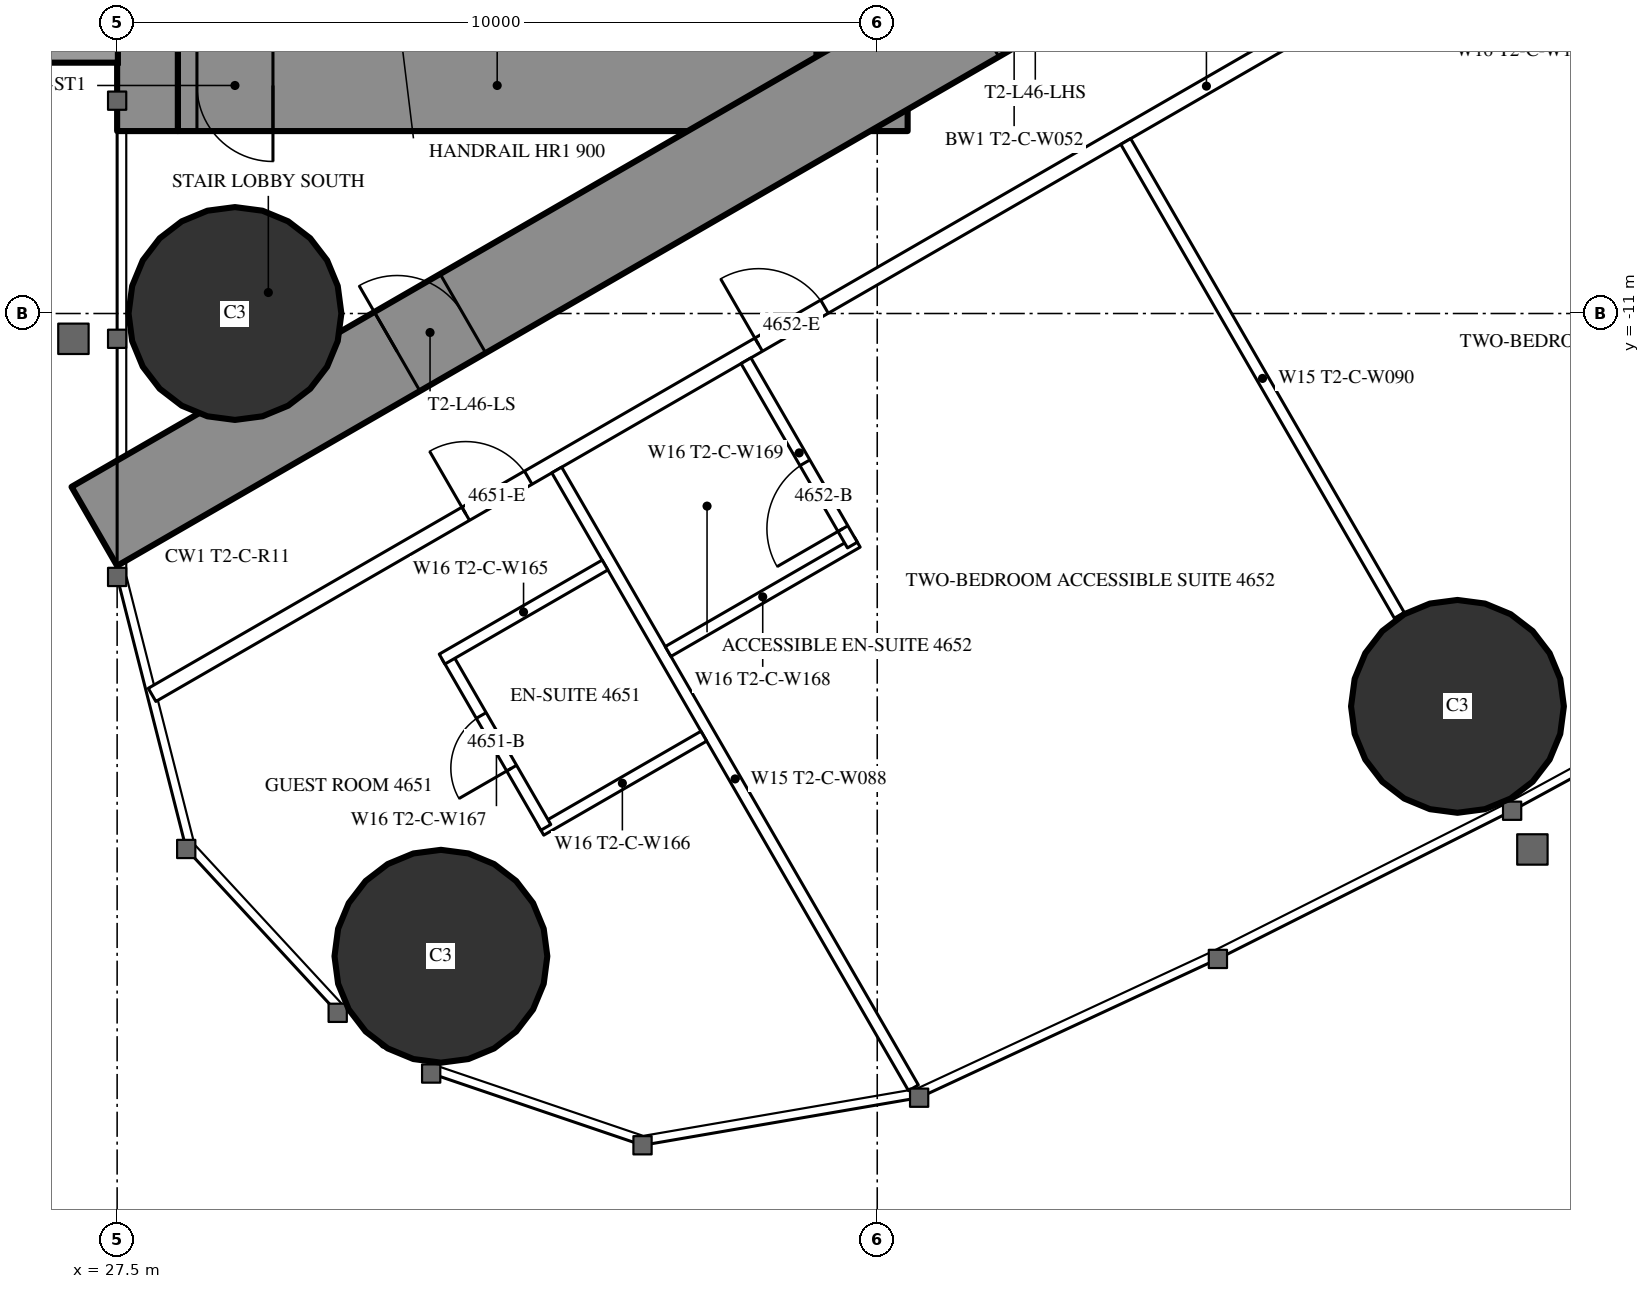
"""IFC4 building model, lengths in metres.
Left out: names, types, materials, properties, quantities, classifications, styles, units other than length and angle.
Written with IfcOpenShell. Run it as: python <this file> out.ifc"""

import sys

from ifc_helpers import new_model, si_unit, direction, frame, frame_2d, origin, origin_2d, place, context, subcontext, project, spatial, rectangle, circle, extrude, element, fill, save


model = new_model("IFC4")
c1 = context("Model", 3, precision=1e-05, world=origin(), true_north=direction((0.0, 1.0)))
c2 = subcontext(c1, "Body", "Model", "MODEL_VIEW")
j1 = project(units=[si_unit("LENGTHUNIT", "METRE"), si_unit("PLANEANGLEUNIT", "RADIAN")], contexts=[c1])
p1 = place(None, origin())
s1 = spatial("IfcSite", under=j1, at=p1, CompositionType="ELEMENT")
p2 = place(p1, origin())
s2 = spatial("IfcBuilding", under=s1, at=p2, CompositionType="ELEMENT")
p3 = place(p2, frame((0.0, 0.0, 173.8)))
s3 = spatial("IfcBuildingStorey", under=s2, at=p3, CompositionType="ELEMENT", Elevation=173.8)
for number, where, z_axis, x_axis in (
    (1, (31.76, -19.456, 0.0), (0.0, 0.0, 1.0), (1.0, 0.0, 0.0)),
    (2, (29.05, -11.0, 0.0), (0.0, 0.0, 1.0), (1.0, 0.0, 0.0)),
    (3, (45.134, -16.168, 0.0), (0.0, 0.0, 1.0), (1.0, 0.0, 0.0)),
):
    element("IfcColumn", number, at=place(p3, frame(where, z_axis=z_axis, x_axis=x_axis)), inside=s3, PredefinedType="COLUMN", context=c2, shape_type="SweptSolid", body=[
        extrude(circle(Radius=1.4, at=origin_2d()), origin(), (0.0, 0.0, 1.0), 3.5),
    ])
p4 = place(p3, frame((27.9, -8.6, 0.0), z_axis=(0.0, 0.0, 1.0), x_axis=(0.0, 1.0, 0.0)))
e4 = element("IfcWall", 4, at=p4, inside=s3, PredefinedType="SHEAR", context=c2, shape_type="SweptSolid", body=[
    extrude(rectangle(XDim=17.2, YDim=0.8, at=frame_2d((8.6, 0.0))), origin(), (0.0, 0.0, 1.0), 3.5),
])
p5 = place(p4, frame((2.45, 0.0, 0.6)))
e5 = element("IfcOpeningElement", 5, at=p5, cuts=e4, PredefinedType="OPENING", context=c2, shape_type="SweptSolid", body=[
    extrude(rectangle(XDim=0.6, YDim=2.1, at=frame_2d((0.3, 1.05))), frame((0.0, 0.41, 0.0), z_axis=(0.0, -1.0, 0.0), x_axis=(1.0, 0.0, 0.0)), (0.0, 0.0, 1.0), 0.82),
])
p6 = place(p4, frame((14.15, 0.0, 0.6)))
e6 = element("IfcOpeningElement", 6, at=p6, cuts=e4, PredefinedType="OPENING", context=c2, shape_type="SweptSolid", body=[
    extrude(rectangle(XDim=0.6, YDim=2.1, at=frame_2d((0.3, 1.05))), frame((0.0, 0.41, 0.0), z_axis=(0.0, -1.0, 0.0), x_axis=(1.0, 0.0, 0.0)), (0.0, 0.0, 1.0), 0.82),
])
p7 = place(p3, frame((37.3, -8.6, 0.0), z_axis=(0.0, 0.0, 1.0), x_axis=(0.0, 1.0, 0.0)))
e7 = element("IfcWall", 7, at=p7, inside=s3, PredefinedType="SHEAR", context=c2, shape_type="SweptSolid", body=[
    extrude(rectangle(XDim=17.2, YDim=1.2, at=frame_2d((8.6, 0.0))), origin(), (0.0, 0.0, 1.0), 3.5),
])
p8 = place(p7, frame((7.7, 0.0, 0.0)))
e8 = element("IfcOpeningElement", 8, at=p8, cuts=e7, PredefinedType="OPENING", context=c2, shape_type="SweptSolid", body=[
    extrude(rectangle(XDim=1.8, YDim=2.2, at=frame_2d((0.9, 1.1))), frame((0.0, 0.61, 0.0), z_axis=(0.0, -1.0, 0.0), x_axis=(1.0, 0.0, 0.0)), (0.0, 0.0, 1.0), 1.22),
])
p9 = place(p3, frame((28.3, -8.0, 0.0), z_axis=(0.0, 0.0, 1.0), x_axis=(1.0, 0.0, 0.0)))
e9 = element("IfcWall", 9, at=p9, inside=s3, PredefinedType="SHEAR", context=c2, shape_type="SweptSolid", body=[
    extrude(rectangle(XDim=8.4, YDim=1.2, at=frame_2d((4.2, 0.0))), origin(), (0.0, 0.0, 1.0), 3.5),
])
p10 = place(p9, frame((0.25, 0.0, 0.0)))
e10 = element("IfcOpeningElement", 10, at=p10, cuts=e9, PredefinedType="OPENING", context=c2, shape_type="SweptSolid", body=[
    extrude(rectangle(XDim=1.0, YDim=2.2, at=frame_2d((0.5, 1.1))), frame((0.0, 0.61, 0.0), z_axis=(0.0, -1.0, 0.0), x_axis=(1.0, 0.0, 0.0)), (0.0, 0.0, 1.0), 1.22),
])
p11 = place(p3, frame((27.2, -13.8, 0.0), z_axis=(0.0, 0.0, 1.0), x_axis=(0.866027159892, 0.499996958321, 0.0)))
e11 = element("IfcWall", 11, at=p11, inside=s3, PredefinedType="SHEAR", context=c2, shape_type="SweptSolid", body=[
    extrude(rectangle(XDim=27.947, YDim=1.2, at=frame_2d((13.973, 0.0))), origin(), (0.0, 0.0, 1.0), 3.5),
])
p12 = place(p11, frame((4.6, 0.0, 0.0)))
e12 = element("IfcOpeningElement", 12, at=p12, cuts=e11, PredefinedType="OPENING", context=c2, shape_type="SweptSolid", body=[
    extrude(rectangle(XDim=1.0, YDim=2.2, at=frame_2d((0.5, 1.1))), frame((0.0, 0.61, 0.0), z_axis=(0.0, -1.0, 0.0), x_axis=(1.0, 0.0, 0.0)), (0.0, 0.0, 1.0), 1.22),
])
p13 = place(p11, frame((13.395, 0.0, 0.0)))
e13 = element("IfcOpeningElement", 13, at=p13, cuts=e11, PredefinedType="OPENING", context=c2, shape_type="SweptSolid", body=[
    extrude(rectangle(XDim=1.8, YDim=2.2, at=frame_2d((0.9, 1.1))), frame((0.0, 0.61, 0.0), z_axis=(0.0, -1.0, 0.0), x_axis=(1.0, 0.0, 0.0)), (0.0, 0.0, 1.0), 1.22),
])
p14 = place(p3, frame((27.959, -16.017, 0.0), z_axis=(0.0, 0.0, 1.0), x_axis=(0.866024151371, 0.500002169237, 0.0)))
e14 = element("IfcWall", 14, at=p14, inside=s3, PredefinedType="PARTITIONING", context=c2, shape_type="SweptSolid", body=[
    extrude(rectangle(XDim=32.034, YDim=0.2, at=frame_2d((16.017, 0.0))), origin(), (0.0, 0.0, 1.0), 3.25),
])
p15 = place(p14, frame((4.765, 0.0, 0.0)))
e15 = element("IfcOpeningElement", 15, at=p15, cuts=e14, PredefinedType="OPENING", context=c2, shape_type="SweptSolid", body=[
    extrude(rectangle(XDim=0.95, YDim=2.2, at=frame_2d((0.475, 1.1))), frame((0.0, 0.11, 0.0), z_axis=(0.0, -1.0, 0.0), x_axis=(1.0, 0.0, 0.0)), (0.0, 0.0, 1.0), 0.22),
])
p16 = place(p14, frame((9.215, 0.0, 0.0)))
e16 = element("IfcOpeningElement", 16, at=p16, cuts=e14, PredefinedType="OPENING", context=c2, shape_type="SweptSolid", body=[
    extrude(rectangle(XDim=1.0, YDim=2.2, at=frame_2d((0.5, 1.1))), frame((0.0, 0.11, 0.0), z_axis=(0.0, -1.0, 0.0), x_axis=(1.0, 0.0, 0.0)), (0.0, 0.0, 1.0), 0.22),
])
p17 = place(p14, frame((19.725, 0.0, 0.0)))
e17 = element("IfcOpeningElement", 17, at=p17, cuts=e14, PredefinedType="OPENING", context=c2, shape_type="SweptSolid", body=[
    extrude(rectangle(XDim=0.95, YDim=2.2, at=frame_2d((0.475, 1.1))), frame((0.0, 0.11, 0.0), z_axis=(0.0, -1.0, 0.0), x_axis=(1.0, 0.0, 0.0)), (0.0, 0.0, 1.0), 0.22),
])
p18 = place(p14, frame((26.125, 0.0, 0.0)))
e18 = element("IfcOpeningElement", 18, at=p18, cuts=e14, PredefinedType="OPENING", context=c2, shape_type="SweptSolid", body=[
    extrude(rectangle(XDim=0.95, YDim=2.2, at=frame_2d((0.475, 1.1))), frame((0.0, 0.11, 0.0), z_axis=(0.0, -1.0, 0.0), x_axis=(1.0, 0.0, 0.0)), (0.0, 0.0, 1.0), 0.22),
])
p19 = place(p14, frame((28.106, 0.0, 0.0)))
e19 = element("IfcOpeningElement", 19, at=p19, cuts=e14, PredefinedType="OPENING", context=c2, shape_type="SweptSolid", body=[
    extrude(rectangle(XDim=0.95, YDim=2.2, at=frame_2d((0.475, 1.1))), frame((0.0, 0.11, 0.0), z_axis=(0.0, -1.0, 0.0), x_axis=(1.0, 0.0, 0.0)), (0.0, 0.0, 1.0), 0.22),
])
p20 = place(p3, frame((33.284, -13.059, 0.0), z_axis=(0.0, 0.0, 1.0), x_axis=(0.499985904184, -0.866033541855, 0.0)))
e20 = element("IfcWall", 20, at=p20, inside=s3, PredefinedType="PARTITIONING", context=c2, shape_type="SweptSolid", body=[
    extrude(rectangle(XDim=9.385, YDim=0.15, at=frame_2d((4.693, 0.0))), origin(), (0.0, 0.0, 1.0), 3.25),
])
p21 = place(p3, frame((40.769, -8.737, 0.0), z_axis=(0.0, 0.0, 1.0), x_axis=(0.500013115284, -0.866017831539, 0.0)))
e21 = element("IfcWall", 21, at=p21, inside=s3, PredefinedType="PARTITIONING", context=c2, shape_type="SweptSolid", body=[
    extrude(rectangle(XDim=7.198, YDim=0.15, at=frame_2d((3.599, 0.0))), origin(), (0.0, 0.0, 1.0), 2.3),
])
p22 = place(p3, frame((33.075, -17.798, 0.0), z_axis=(0.0, 0.0, 1.0), x_axis=(0.866006523861, 0.500032699561, 0.0)))
e22 = element("IfcWall", 22, at=p22, inside=s3, PredefinedType="PARTITIONING", context=c2, shape_type="SweptSolid", body=[
    extrude(rectangle(XDim=2.475, YDim=0.15, at=frame_2d((1.237, 0.0))), origin(), (0.0, 0.0, 1.0), 3.25),
])
p23 = place(p3, frame((31.84, -15.509, 0.0), z_axis=(0.0, 0.0, 1.0), x_axis=(0.500006934395, -0.866021400173, 0.0)))
e23 = element("IfcWall", 23, at=p23, inside=s3, PredefinedType="PARTITIONING", context=c2, shape_type="SweptSolid", body=[
    extrude(rectangle(XDim=2.6, YDim=0.15, at=frame_2d((1.3, 0.0))), origin(), (0.0, 0.0, 1.0), 3.25),
])
p24 = place(p23, frame((0.9, 0.0, 0.0)))
e24 = element("IfcOpeningElement", 24, at=p24, cuts=e23, PredefinedType="OPENING", context=c2, shape_type="SweptSolid", body=[
    extrude(rectangle(XDim=0.8, YDim=2.2, at=frame_2d((0.4, 1.1))), frame((0.0, 0.085, 0.0), z_axis=(0.0, -1.0, 0.0), x_axis=(1.0, 0.0, 0.0)), (0.0, 0.0, 1.0), 0.17),
])
p25 = place(p3, frame((31.775, -15.546, 0.0), z_axis=(0.0, 0.0, 1.0), x_axis=(0.866031185235, 0.4999899861, 0.0)))
e25 = element("IfcWall", 25, at=p25, inside=s3, PredefinedType="PARTITIONING", context=c2, shape_type="SweptSolid", body=[
    extrude(rectangle(XDim=2.475, YDim=0.15, at=frame_2d((1.238, 0.0))), origin(), (0.0, 0.0, 1.0), 3.25),
])
p26 = place(p3, frame((34.749, -15.446, 0.0), z_axis=(0.0, 0.0, 1.0), x_axis=(0.866018712932, 0.500011588718, 0.0)))
e26 = element("IfcWall", 26, at=p26, inside=s3, PredefinedType="PARTITIONING", context=c2, shape_type="SweptSolid", body=[
    extrude(rectangle(XDim=2.875, YDim=0.15, at=frame_2d((1.438, 0.0))), origin(), (0.0, 0.0, 1.0), 3.25),
])
p27 = place(p3, frame((35.773, -11.621, 0.0), z_axis=(0.0, 0.0, 1.0), x_axis=(0.49998411664, -0.866034573852, 0.0)))
e27 = element("IfcWall", 27, at=p27, inside=s3, PredefinedType="PARTITIONING", context=c2, shape_type="SweptSolid", body=[
    extrude(rectangle(XDim=2.8, YDim=0.15, at=frame_2d((1.4, 0.0))), origin(), (0.0, 0.0, 1.0), 3.25),
])
p28 = place(p27, frame((1.55, 0.0, 0.0)))
e28 = element("IfcOpeningElement", 28, at=p28, cuts=e27, PredefinedType="OPENING", context=c2, shape_type="SweptSolid", body=[
    extrude(rectangle(XDim=1.0, YDim=2.2, at=frame_2d((0.5, 1.1))), frame((0.0, 0.085, 0.0), z_axis=(0.0, -1.0, 0.0), x_axis=(1.0, 0.0, 0.0)), (0.0, 0.0, 1.0), 0.17),
])
p29 = place(p3, frame((46.131, -5.641, 0.0), z_axis=(0.0, 0.0, 1.0), x_axis=(0.49997716683, -0.86603858612, 0.0)))
e29 = element("IfcWall", 29, at=p29, inside=s3, PredefinedType="PARTITIONING", context=c2, shape_type="SweptSolid", body=[
    extrude(rectangle(XDim=2.6, YDim=0.15, at=frame_2d((1.3, 0.0))), origin(), (0.0, 0.0, 1.0), 3.25),
])
p30 = place(p29, frame((0.9, 0.0, 0.0)))
e30 = element("IfcOpeningElement", 30, at=p30, cuts=e29, PredefinedType="OPENING", context=c2, shape_type="SweptSolid", body=[
    extrude(rectangle(XDim=0.8, YDim=2.2, at=frame_2d((0.4, 1.1))), frame((0.0, 0.085, 0.0), z_axis=(0.0, -1.0, 0.0), x_axis=(1.0, 0.0, 0.0)), (0.0, 0.0, 1.0), 0.17),
])
p31 = place(p24, origin())
e31 = element("IfcDoor", 31, at=p31, inside=s3, OperationType="SINGLE_SWING_RIGHT", PredefinedType="DOOR", context=c2, shape_type="SweptSolid", body=[
    extrude(rectangle(XDim=0.8, YDim=2.2, at=frame_2d((0.4, 1.1))), frame((0.0, 0.025, 0.0), z_axis=(0.0, -1.0, 0.0), x_axis=(1.0, 0.0, 0.0)), (0.0, 0.0, 1.0), 0.05),
])
fill(e24, e31)
p32 = place(p15, origin())
e32 = element("IfcDoor", 32, at=p32, inside=s3, OperationType="SINGLE_SWING_LEFT", PredefinedType="DOOR", context=c2, shape_type="SweptSolid", body=[
    extrude(rectangle(XDim=0.95, YDim=2.2, at=frame_2d((0.475, 1.1))), frame((0.0, 0.025, 0.0), z_axis=(0.0, -1.0, 0.0), x_axis=(1.0, 0.0, 0.0)), (0.0, 0.0, 1.0), 0.05),
])
fill(e15, e32)
p33 = place(p28, origin())
e33 = element("IfcDoor", 33, at=p33, inside=s3, OperationType="SINGLE_SWING_RIGHT", PredefinedType="DOOR", context=c2, shape_type="SweptSolid", body=[
    extrude(rectangle(XDim=1.0, YDim=2.2, at=frame_2d((0.5, 1.1))), frame((0.0, 0.025, 0.0), z_axis=(0.0, -1.0, 0.0), x_axis=(1.0, 0.0, 0.0)), (0.0, 0.0, 1.0), 0.05),
])
fill(e28, e33)
p34 = place(p16, origin())
e34 = element("IfcDoor", 34, at=p34, inside=s3, OperationType="SINGLE_SWING_LEFT", PredefinedType="DOOR", context=c2, shape_type="SweptSolid", body=[
    extrude(rectangle(XDim=1.0, YDim=2.2, at=frame_2d((0.5, 1.1))), frame((0.0, 0.025, 0.0), z_axis=(0.0, -1.0, 0.0), x_axis=(1.0, 0.0, 0.0)), (0.0, 0.0, 1.0), 0.05),
])
fill(e16, e34)
p35 = place(p12, origin())
e35 = element("IfcDoor", 35, at=p35, inside=s3, OperationType="SINGLE_SWING_LEFT", PredefinedType="DOOR", context=c2, shape_type="SweptSolid", body=[
    extrude(rectangle(XDim=1.0, YDim=2.2, at=frame_2d((0.5, 1.1))), frame((0.0, 0.025, 0.0), z_axis=(0.0, -1.0, 0.0), x_axis=(1.0, 0.0, 0.0)), (0.0, 0.0, 1.0), 0.05),
])
fill(e12, e35)
p36 = place(p10, origin())
e36 = element("IfcDoor", 36, at=p36, inside=s3, OperationType="SINGLE_SWING_RIGHT", PredefinedType="DOOR", context=c2, shape_type="SweptSolid", body=[
    extrude(rectangle(XDim=1.0, YDim=2.2, at=frame_2d((0.5, 1.1))), frame((0.0, 0.025, 0.0), z_axis=(0.0, -1.0, 0.0), x_axis=(1.0, 0.0, 0.0)), (0.0, 0.0, 1.0), 0.05),
])
fill(e10, e36)
save(model, sys.argv[1])
